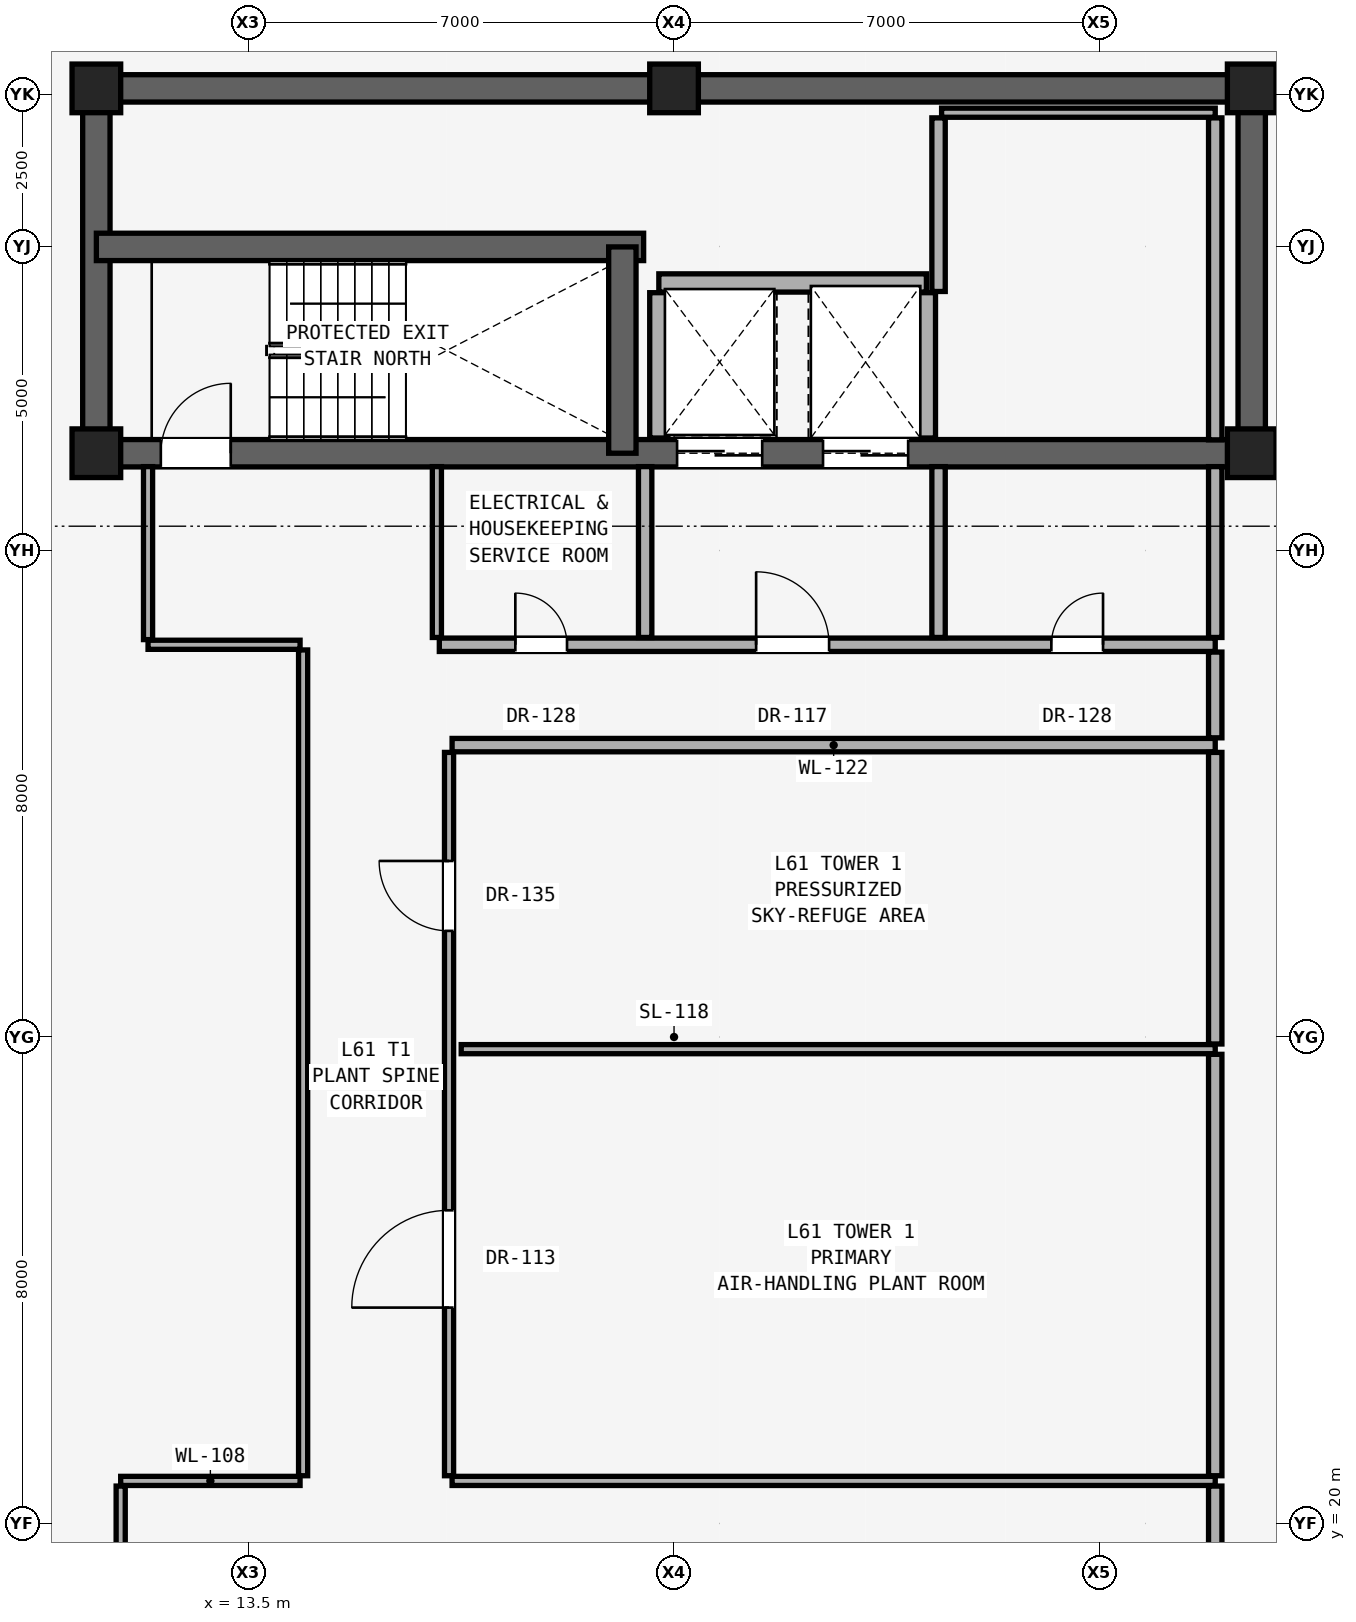
"""IFC4 building model, lengths in metres.
Left out: names, types, materials, properties, quantities, classifications, styles, units other than length and angle.
Written with IfcOpenShell. Run it as: python <this file> out.ifc"""

import sys

from ifc_helpers import new_model, si_unit, direction, frame, frame_2d, origin, origin_2d, place, context, subcontext, project, spatial, rectangle, extrude, element, fill, save


model = new_model("IFC4")
c1 = context("Model", 3, precision=1e-05, world=origin(), true_north=direction((0.0, 1.0)))
c2 = subcontext(c1, "Body", "Model", "MODEL_VIEW")
j1 = project(units=[si_unit("LENGTHUNIT", "METRE"), si_unit("PLANEANGLEUNIT", "RADIAN")], contexts=[c1])
p1 = place(None, origin())
s1 = spatial("IfcSite", under=j1, at=p1, CompositionType="ELEMENT")
p2 = place(p1, origin())
s2 = spatial("IfcBuilding", under=s1, at=p2, CompositionType="ELEMENT")
p3 = place(p2, frame((0.0, 0.0, 212.9)))
s3 = spatial("IfcBuildingStorey", under=s2, at=p3, CompositionType="ELEMENT", Elevation=212.9)
for number, where, z_axis, x_axis in (
    (1, (11.0, 37.6, 0.0), (0.0, 0.0, 1.0), (1.0, 0.0, 0.0)),
    (2, (30.0, 37.6, 0.0), (0.0, 0.0, 1.0), (1.0, 0.0, 0.0)),
    (3, (11.0, 43.6, 0.0), (0.0, 0.0, 1.0), (1.0, 0.0, 0.0)),
    (4, (20.5, 43.6, 0.0), (0.0, 0.0, 1.0), (1.0, 0.0, 0.0)),
    (5, (30.0, 43.6, 0.0), (0.0, 0.0, 1.0), (1.0, 0.0, 0.0)),
):
    element("IfcColumn", number, at=place(p3, frame(where, z_axis=z_axis, x_axis=x_axis)), inside=s3, PredefinedType="COLUMN", context=c2, shape_type="SweptSolid", body=[
        extrude(rectangle(XDim=0.8, YDim=0.8, at=origin_2d()), origin(), (0.0, 0.0, 1.0), 6.5),
    ])
p4 = place(p3, frame((11.0, 43.6, 0.0), z_axis=(0.0, 0.0, 1.0), x_axis=(1.0, 0.0, 0.0)))
e6 = element("IfcWall", 6, at=p4, inside=s3, PredefinedType="SHEAR", context=c2, shape_type="SweptSolid", body=[
    extrude(rectangle(XDim=19.0, YDim=0.45, at=frame_2d((9.5, 0.0))), origin(), (0.0, 0.0, 1.0), 6.3),
])
for number, where, z_axis, x_axis in (
    (7, (11.0, 37.6, 0.0), (0.0, 0.0, 1.0), (0.0, 1.0, 0.0)),
    (8, (30.0, 37.6, 0.0), (0.0, 0.0, 1.0), (0.0, 1.0, 0.0)),
):
    element("IfcWall", number, at=place(p3, frame(where, z_axis=z_axis, x_axis=x_axis)), inside=s3, PredefinedType="SHEAR", context=c2, shape_type="SweptSolid", body=[
        extrude(rectangle(XDim=6.0, YDim=0.45, at=frame_2d((3.0, 0.0))), origin(), (0.0, 0.0, 1.0), 6.3),
    ])
p5 = place(p3, frame((11.0, 37.6, 0.0), z_axis=(0.0, 0.0, 1.0), x_axis=(1.0, 0.0, 0.0)))
e9 = element("IfcWall", 9, at=p5, inside=s3, PredefinedType="SHEAR", context=c2, shape_type="SweptSolid", body=[
    extrude(rectangle(XDim=19.0, YDim=0.45, at=frame_2d((9.5, 0.0))), origin(), (0.0, 0.0, 1.0), 6.3),
])
p6 = place(p5, frame((1.06, 0.0, 0.0)))
e10 = element("IfcOpeningElement", 10, at=p6, cuts=e9, PredefinedType="OPENING", context=c2, shape_type="SweptSolid", body=[
    extrude(rectangle(XDim=1.15, YDim=2.2, at=frame_2d((0.575, 1.1))), frame((0.0, 0.235, 0.0), z_axis=(0.0, -1.0, 0.0), x_axis=(1.0, 0.0, 0.0)), (0.0, 0.0, 1.0), 0.47),
])
p7 = place(p5, frame((9.55, 0.0, 0.0)))
e11 = element("IfcOpeningElement", 11, at=p7, cuts=e9, PredefinedType="OPENING", context=c2, shape_type="SweptSolid", body=[
    extrude(rectangle(XDim=1.4, YDim=2.35, at=frame_2d((0.7, 1.175))), frame((0.0, 0.235, 0.0), z_axis=(0.0, -1.0, 0.0), x_axis=(1.0, 0.0, 0.0)), (0.0, 0.0, 1.0), 0.47),
])
p8 = place(p5, frame((11.95, 0.0, 0.0)))
e12 = element("IfcOpeningElement", 12, at=p8, cuts=e9, PredefinedType="OPENING", context=c2, shape_type="SweptSolid", body=[
    extrude(rectangle(XDim=1.4, YDim=2.35, at=frame_2d((0.7, 1.175))), frame((0.0, 0.235, 0.0), z_axis=(0.0, -1.0, 0.0), x_axis=(1.0, 0.0, 0.0)), (0.0, 0.0, 1.0), 0.47),
])
p9 = place(p3, frame((11.0, 40.993, 0.0), z_axis=(0.0, 0.0, 1.0), x_axis=(1.0, 0.0, 0.0)))
e13 = element("IfcWall", 13, at=p9, inside=s3, PredefinedType="SHEAR", context=c2, shape_type="SweptSolid", body=[
    extrude(rectangle(XDim=9.0, YDim=0.45, at=frame_2d((4.5, 0.0))), origin(), (0.0, 0.0, 1.0), 6.3),
])
p10 = place(p3, frame((19.65, 37.6, 0.0), z_axis=(0.0, 0.0, 1.0), x_axis=(0.0, 1.0, 0.0)))
e14 = element("IfcWall", 14, at=p10, inside=s3, PredefinedType="SHEAR", context=c2, shape_type="SweptSolid", body=[
    extrude(rectangle(XDim=3.393, YDim=0.45, at=frame_2d((1.696, 0.0))), origin(), (0.0, 0.0, 1.0), 6.3),
])
p11 = place(p3, frame((11.4, 20.7, 0.0), z_axis=(0.0, 0.0, 1.0), x_axis=(1.0, 0.0, 0.0)))
e15 = element("IfcWall", 15, at=p11, inside=s3, PredefinedType="PARTITIONING", context=c2, shape_type="SweptSolid", body=[
    extrude(rectangle(XDim=2.95, YDim=0.15, at=frame_2d((1.475, 0.0))), origin(), (0.0, 0.0, 1.0), 6.3),
])
p12 = place(p3, frame((16.85, 20.7, 0.0), z_axis=(0.0, 0.0, 1.0), x_axis=(1.0, 0.0, 0.0)))
e16 = element("IfcWall", 16, at=p12, inside=s3, PredefinedType="PARTITIONING", context=c2, shape_type="SweptSolid", body=[
    extrude(rectangle(XDim=12.55, YDim=0.15, at=frame_2d((6.275, 0.0))), origin(), (0.0, 0.0, 1.0), 5.875),
])
p13 = place(p3, frame((17.0, 27.8, 0.0), z_axis=(0.0, 0.0, 1.0), x_axis=(1.0, 0.0, 0.0)))
e17 = element("IfcWall", 17, at=p13, inside=s3, PredefinedType="PARTITIONING", context=c2, shape_type="SweptSolid", body=[
    extrude(rectangle(XDim=12.4, YDim=0.15, at=frame_2d((6.2, 0.0))), origin(), (0.0, 0.0, 1.0), 5.875),
])
p14 = place(p3, frame((16.85, 32.8, 0.0), z_axis=(0.0, 0.0, 1.0), x_axis=(1.0, 0.0, 0.0)))
e18 = element("IfcWall", 18, at=p14, inside=s3, PredefinedType="SOLIDWALL", context=c2, shape_type="SweptSolid", body=[
    extrude(rectangle(XDim=12.55, YDim=0.22, at=frame_2d((6.275, 0.0))), origin(), (0.0, 0.0, 1.0), 5.875),
])
p15 = place(p3, frame((11.85, 34.45, 0.0), z_axis=(0.0, 0.0, 1.0), x_axis=(1.0, 0.0, 0.0)))
e19 = element("IfcWall", 19, at=p15, inside=s3, PredefinedType="PARTITIONING", context=c2, shape_type="SweptSolid", body=[
    extrude(rectangle(XDim=2.5, YDim=0.15, at=frame_2d((1.25, 0.0))), origin(), (0.0, 0.0, 1.0), 6.3),
])
p16 = place(p3, frame((16.64, 34.45, 0.0), z_axis=(0.0, 0.0, 1.0), x_axis=(1.0, 0.0, 0.0)))
e20 = element("IfcWall", 20, at=p16, inside=s3, PredefinedType="SOLIDWALL", context=c2, shape_type="SweptSolid", body=[
    extrude(rectangle(XDim=12.76, YDim=0.22, at=frame_2d((6.38, 0.0))), origin(), (0.0, 0.0, 1.0), 5.875),
])
p17 = place(p16, frame((5.21, 0.0, 0.0)))
e21 = element("IfcOpeningElement", 21, at=p17, cuts=e20, PredefinedType="OPENING", context=c2, shape_type="SweptSolid", body=[
    extrude(rectangle(XDim=1.2, YDim=2.25, at=frame_2d((0.6, 1.125))), frame((0.0, 0.12, 0.0), z_axis=(0.0, -1.0, 0.0), x_axis=(1.0, 0.0, 0.0)), (0.0, 0.0, 1.0), 0.24),
])
p18 = place(p16, frame((10.065, 0.0, 0.0)))
e22 = element("IfcOpeningElement", 22, at=p18, cuts=e20, PredefinedType="OPENING", context=c2, shape_type="SweptSolid", body=[
    extrude(rectangle(XDim=0.85, YDim=2.01, at=frame_2d((0.425, 1.005))), frame((0.0, 0.12, 0.0), z_axis=(0.0, -1.0, 0.0), x_axis=(1.0, 0.0, 0.0)), (0.0, 0.0, 1.0), 0.24),
])
p19 = place(p16, frame((1.25, 0.0, 0.0)))
e23 = element("IfcOpeningElement", 23, at=p19, cuts=e20, PredefinedType="OPENING", context=c2, shape_type="SweptSolid", body=[
    extrude(rectangle(XDim=0.85, YDim=2.01, at=frame_2d((0.425, 1.005))), frame((0.0, 0.12, 0.0), z_axis=(0.0, -1.0, 0.0), x_axis=(1.0, 0.0, 0.0)), (0.0, 0.0, 1.0), 0.24),
])
p20 = place(p3, frame((20.25, 40.4, 0.0), z_axis=(0.0, 0.0, 1.0), x_axis=(1.0, 0.0, 0.0)))
e24 = element("IfcWall", 24, at=p20, inside=s3, PredefinedType="SOLIDWALL", context=c2, shape_type="SweptSolid", body=[
    extrude(rectangle(XDim=4.4, YDim=0.3, at=frame_2d((2.2, 0.0))), origin(), (0.0, 0.0, 1.0), 6.3),
])
p21 = place(p3, frame((24.9, 43.2, 0.0), z_axis=(0.0, 0.0, 1.0), x_axis=(1.0, 0.0, 0.0)))
e25 = element("IfcWall", 25, at=p21, inside=s3, PredefinedType="PARTITIONING", context=c2, shape_type="SweptSolid", body=[
    extrude(rectangle(XDim=4.5, YDim=0.15, at=frame_2d((2.25, 0.0))), origin(), (0.0, 0.0, 1.0), 6.3),
])
p22 = place(p3, frame((11.4, 18.62, 0.0), z_axis=(0.0, 0.0, 1.0), x_axis=(0.0, 1.0, 0.0)))
e26 = element("IfcWall", 26, at=p22, inside=s3, PredefinedType="PARTITIONING", context=c2, shape_type="SweptSolid", body=[
    extrude(rectangle(XDim=1.995, YDim=0.15, at=frame_2d((0.998, 0.0))), origin(), (0.0, 0.0, 1.0), 6.3),
])
p23 = place(p3, frame((11.85, 34.535, 0.0), z_axis=(0.0, 0.0, 1.0), x_axis=(0.0, 1.0, 0.0)))
e27 = element("IfcWall", 27, at=p23, inside=s3, PredefinedType="PARTITIONING", context=c2, shape_type="SweptSolid", body=[
    extrude(rectangle(XDim=2.845, YDim=0.15, at=frame_2d((1.422, 0.0))), origin(), (0.0, 0.0, 1.0), 6.3),
])
p24 = place(p3, frame((14.4, 20.785, 0.0), z_axis=(0.0, 0.0, 1.0), x_axis=(0.0, 1.0, 0.0)))
e28 = element("IfcWall", 28, at=p24, inside=s3, PredefinedType="PARTITIONING", context=c2, shape_type="SweptSolid", body=[
    extrude(rectangle(XDim=13.58, YDim=0.15, at=frame_2d((6.79, 0.0))), origin(), (0.0, 0.0, 1.0), 5.436),
])
p25 = place(p3, frame((16.6, 34.57, 0.0), z_axis=(0.0, 0.0, 1.0), x_axis=(0.0, 1.0, 0.0)))
e29 = element("IfcWall", 29, at=p25, inside=s3, PredefinedType="PARTITIONING", context=c2, shape_type="SweptSolid", body=[
    extrude(rectangle(XDim=2.81, YDim=0.15, at=frame_2d((1.405, 0.0))), origin(), (0.0, 0.0, 1.0), 6.3),
])
p26 = place(p3, frame((16.8, 20.785, 0.0), z_axis=(0.0, 0.0, 1.0), x_axis=(0.0, 1.0, 0.0)))
e30 = element("IfcWall", 30, at=p26, inside=s3, PredefinedType="PARTITIONING", context=c2, shape_type="SweptSolid", body=[
    extrude(rectangle(XDim=11.895, YDim=0.15, at=frame_2d((5.948, 0.0))), origin(), (0.0, 0.0, 1.0), 5.436),
])
p27 = place(p26, frame((8.96, 0.0, 0.0)))
e31 = element("IfcOpeningElement", 31, at=p27, cuts=e30, PredefinedType="OPENING", context=c2, shape_type="SweptSolid", body=[
    extrude(rectangle(XDim=1.15, YDim=2.2, at=frame_2d((0.575, 1.1))), frame((0.0, 0.085, 0.0), z_axis=(0.0, -1.0, 0.0), x_axis=(1.0, 0.0, 0.0)), (0.0, 0.0, 1.0), 0.17),
])
p28 = place(p26, frame((2.765, 0.0, 0.0)))
e32 = element("IfcOpeningElement", 32, at=p28, cuts=e30, PredefinedType="OPENING", context=c2, shape_type="SweptSolid", body=[
    extrude(rectangle(XDim=1.6, YDim=2.3, at=frame_2d((0.8, 1.15))), frame((0.0, 0.085, 0.0), z_axis=(0.0, -1.0, 0.0), x_axis=(1.0, 0.0, 0.0)), (0.0, 0.0, 1.0), 0.17),
])
p29 = place(p3, frame((20.025, 34.57, 0.0), z_axis=(0.0, 0.0, 1.0), x_axis=(0.0, 1.0, 0.0)))
e33 = element("IfcWall", 33, at=p29, inside=s3, PredefinedType="SOLIDWALL", context=c2, shape_type="SweptSolid", body=[
    extrude(rectangle(XDim=2.81, YDim=0.22, at=frame_2d((1.405, 0.0))), origin(), (0.0, 0.0, 1.0), 6.3),
])
for number, where, z_axis, x_axis in (
    (34, (20.25, 37.85, 0.0), (0.0, 0.0, 1.0), (0.0, 1.0, 0.0)),
    (35, (24.65, 37.85, 0.0), (0.0, 0.0, 1.0), (0.0, 1.0, 0.0)),
):
    element("IfcWall", number, at=place(p3, frame(where, z_axis=z_axis, x_axis=x_axis)), inside=s3, PredefinedType="SOLIDWALL", context=c2, shape_type="SweptSolid", body=[
        extrude(rectangle(XDim=2.39, YDim=0.3, at=frame_2d((1.195, 0.0))), origin(), (0.0, 0.0, 1.0), 6.3),
    ])
p30 = place(p3, frame((24.85, 34.57, 0.0), z_axis=(0.0, 0.0, 1.0), x_axis=(0.0, 1.0, 0.0)))
e36 = element("IfcWall", 36, at=p30, inside=s3, PredefinedType="SOLIDWALL", context=c2, shape_type="SweptSolid", body=[
    extrude(rectangle(XDim=2.81, YDim=0.22, at=frame_2d((1.405, 0.0))), origin(), (0.0, 0.0, 1.0), 6.3),
])
p31 = place(p3, frame((24.85, 40.26, 0.0), z_axis=(0.0, 0.0, 1.0), x_axis=(0.0, 1.0, 0.0)))
e37 = element("IfcWall", 37, at=p31, inside=s3, PredefinedType="SOLIDWALL", context=c2, shape_type="SweptSolid", body=[
    extrude(rectangle(XDim=2.855, YDim=0.22, at=frame_2d((1.427, 0.0))), origin(), (0.0, 0.0, 1.0), 6.3),
])
p32 = place(p3, frame((29.4, 18.62, 0.0), z_axis=(0.0, 0.0, 1.0), x_axis=(0.0, 1.0, 0.0)))
e38 = element("IfcWall", 38, at=p32, inside=s3, PredefinedType="SOLIDWALL", context=c2, shape_type="SweptSolid", body=[
    extrude(rectangle(XDim=1.995, YDim=0.22, at=frame_2d((0.998, 0.0))), origin(), (0.0, 0.0, 1.0), 6.3),
])
p33 = place(p3, frame((29.4, 20.785, 0.0), z_axis=(0.0, 0.0, 1.0), x_axis=(0.0, 1.0, 0.0)))
e39 = element("IfcWall", 39, at=p33, inside=s3, PredefinedType="SOLIDWALL", context=c2, shape_type="SweptSolid", body=[
    extrude(rectangle(XDim=6.93, YDim=0.22, at=frame_2d((3.465, 0.0))), origin(), (0.0, 0.0, 1.0), 5.436),
])
p34 = place(p3, frame((29.4, 27.885, 0.0), z_axis=(0.0, 0.0, 1.0), x_axis=(0.0, 1.0, 0.0)))
e40 = element("IfcWall", 40, at=p34, inside=s3, PredefinedType="SOLIDWALL", context=c2, shape_type="SweptSolid", body=[
    extrude(rectangle(XDim=4.795, YDim=0.22, at=frame_2d((2.397, 0.0))), origin(), (0.0, 0.0, 1.0), 5.436),
])
p35 = place(p3, frame((29.4, 32.92, 0.0), z_axis=(0.0, 0.0, 1.0), x_axis=(0.0, 1.0, 0.0)))
e41 = element("IfcWall", 41, at=p35, inside=s3, PredefinedType="SOLIDWALL", context=c2, shape_type="SweptSolid", body=[
    extrude(rectangle(XDim=1.41, YDim=0.22, at=frame_2d((0.705, 0.0))), origin(), (0.0, 0.0, 1.0), 6.3),
])
p36 = place(p3, frame((29.4, 34.57, 0.0), z_axis=(0.0, 0.0, 1.0), x_axis=(0.0, 1.0, 0.0)))
e42 = element("IfcWall", 42, at=p36, inside=s3, PredefinedType="SOLIDWALL", context=c2, shape_type="SweptSolid", body=[
    extrude(rectangle(XDim=2.81, YDim=0.22, at=frame_2d((1.405, 0.0))), origin(), (0.0, 0.0, 1.0), 6.3),
])
p37 = place(p3, frame((29.4, 37.82, 0.0), z_axis=(0.0, 0.0, 1.0), x_axis=(0.0, 1.0, 0.0)))
e43 = element("IfcWall", 43, at=p37, inside=s3, PredefinedType="SOLIDWALL", context=c2, shape_type="SweptSolid", body=[
    extrude(rectangle(XDim=5.295, YDim=0.22, at=frame_2d((2.647, 0.0))), origin(), (0.0, 0.0, 1.0), 6.3),
])
p38 = place(p6, origin())
e44 = element("IfcDoor", 44, at=p38, inside=s3, OperationType="SINGLE_SWING_RIGHT", PredefinedType="DOOR", context=c2, shape_type="SweptSolid", body=[
    extrude(rectangle(XDim=1.15, YDim=2.2, at=frame_2d((0.575, 1.1))), frame((0.0, 0.025, 0.0), z_axis=(0.0, -1.0, 0.0), x_axis=(1.0, 0.0, 0.0)), (0.0, 0.0, 1.0), 0.05),
])
fill(e10, e44)
p39 = place(p17, origin())
e45 = element("IfcDoor", 45, at=p39, inside=s3, OperationType="SINGLE_SWING_LEFT", PredefinedType="DOOR", context=c2, shape_type="SweptSolid", body=[
    extrude(rectangle(XDim=1.2, YDim=2.25, at=frame_2d((0.6, 1.125))), frame((0.0, 0.025, 0.0), z_axis=(0.0, -1.0, 0.0), x_axis=(1.0, 0.0, 0.0)), (0.0, 0.0, 1.0), 0.05),
])
fill(e21, e45)
p40 = place(p18, origin())
e46 = element("IfcDoor", 46, at=p40, inside=s3, OperationType="SINGLE_SWING_RIGHT", PredefinedType="DOOR", context=c2, shape_type="SweptSolid", body=[
    extrude(rectangle(XDim=0.85, YDim=2.01, at=frame_2d((0.425, 1.005))), frame((0.0, 0.025, 0.0), z_axis=(0.0, -1.0, 0.0), x_axis=(1.0, 0.0, 0.0)), (0.0, 0.0, 1.0), 0.05),
])
fill(e22, e46)
p41 = place(p19, origin())
e47 = element("IfcDoor", 47, at=p41, inside=s3, OperationType="SINGLE_SWING_LEFT", PredefinedType="DOOR", context=c2, shape_type="SweptSolid", body=[
    extrude(rectangle(XDim=0.85, YDim=2.01, at=frame_2d((0.425, 1.005))), frame((0.0, 0.025, 0.0), z_axis=(0.0, -1.0, 0.0), x_axis=(1.0, 0.0, 0.0)), (0.0, 0.0, 1.0), 0.05),
])
fill(e23, e47)
p42 = place(p27, origin())
e48 = element("IfcDoor", 48, at=p42, inside=s3, OperationType="SINGLE_SWING_RIGHT", PredefinedType="DOOR", context=c2, shape_type="SweptSolid", body=[
    extrude(rectangle(XDim=1.15, YDim=2.2, at=frame_2d((0.575, 1.1))), frame((0.0, 0.025, 0.0), z_axis=(0.0, -1.0, 0.0), x_axis=(1.0, 0.0, 0.0)), (0.0, 0.0, 1.0), 0.05),
])
fill(e31, e48)
p43 = place(p28, origin())
e49 = element("IfcDoor", 49, at=p43, inside=s3, OperationType="SINGLE_SWING_LEFT", PredefinedType="DOOR", context=c2, shape_type="SweptSolid", body=[
    extrude(rectangle(XDim=1.6, YDim=2.3, at=frame_2d((0.8, 1.15))), frame((0.0, 0.025, 0.0), z_axis=(0.0, -1.0, 0.0), x_axis=(1.0, 0.0, 0.0)), (0.0, 0.0, 1.0), 0.05),
])
fill(e32, e49)
p44 = place(p7, origin())
e50 = element("IfcDoor", 50, at=p44, inside=s3, OperationType="DOUBLE_DOOR_SLIDING", PredefinedType="DOOR", context=c2, shape_type="SweptSolid", body=[
    extrude(rectangle(XDim=1.4, YDim=2.35, at=frame_2d((0.7, 1.175))), frame((0.0, 0.025, 0.0), z_axis=(0.0, -1.0, 0.0), x_axis=(1.0, 0.0, 0.0)), (0.0, 0.0, 1.0), 0.05),
])
fill(e11, e50)
p45 = place(p8, origin())
e51 = element("IfcDoor", 51, at=p45, inside=s3, OperationType="DOUBLE_DOOR_SLIDING", PredefinedType="DOOR", context=c2, shape_type="SweptSolid", body=[
    extrude(rectangle(XDim=1.4, YDim=2.35, at=frame_2d((0.7, 1.175))), frame((0.0, 0.025, 0.0), z_axis=(0.0, -1.0, 0.0), x_axis=(1.0, 0.0, 0.0)), (0.0, 0.0, 1.0), 0.05),
])
fill(e12, e51)
save(model, sys.argv[1])
